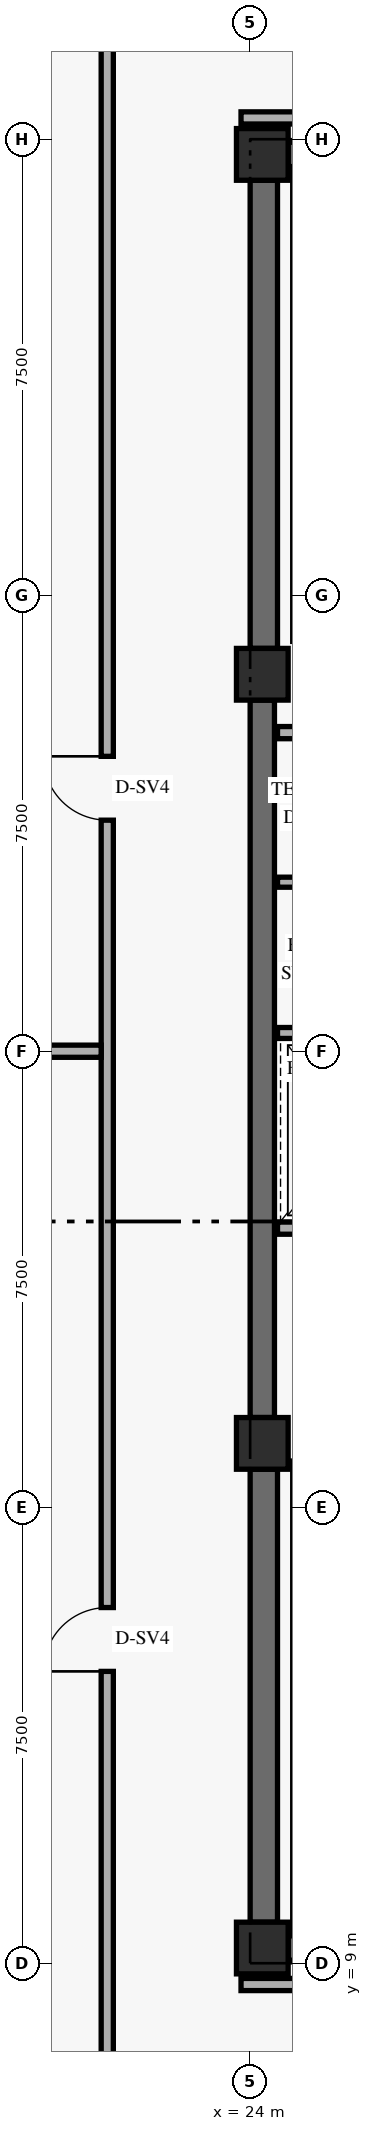
"""IFC4 building model, lengths in metres.
Left out: names, types, materials, properties, quantities, classifications, styles, units other than length and angle.
Written with IfcOpenShell. Run it as: python <this file> out.ifc"""

import sys

from ifc_helpers import new_model, si_unit, direction, frame, frame_2d, origin, origin_2d, place, context, subcontext, project, spatial, rectangle, extrude, element, fill, save


model = new_model("IFC4")
c1 = context("Model", 3, precision=1e-05, world=origin(), true_north=direction((0.0, 1.0)))
c2 = subcontext(c1, "Body", "Model", "MODEL_VIEW")
j1 = project(units=[si_unit("LENGTHUNIT", "METRE"), si_unit("PLANEANGLEUNIT", "RADIAN")], contexts=[c1])
p1 = place(None, origin())
s1 = spatial("IfcSite", under=j1, at=p1, CompositionType="ELEMENT")
p2 = place(p1, origin())
s2 = spatial("IfcBuilding", under=s1, at=p2, CompositionType="ELEMENT")
p3 = place(p2, frame((0.0, 0.0, 135.6)))
s3 = spatial("IfcBuildingStorey", under=s2, at=p3, CompositionType="ELEMENT", Elevation=135.6)
p4 = place(p3, frame((24.225, 9.675, 0.0), z_axis=(0.0, 0.0, 1.0), x_axis=(0.0, 1.0, 0.0)))
e1 = element("IfcWall", 1, at=p4, inside=s3, PredefinedType="SHEAR", context=c2, shape_type="SweptSolid", body=[
    extrude(rectangle(XDim=7.45, YDim=0.45, at=frame_2d((3.725, 0.0))), origin(), (0.0, 0.0, 1.0), 4.549),
])
p5 = place(p3, frame((24.2, 17.975, 0.0), z_axis=(0.0, 0.0, 1.0), x_axis=(0.0, 1.0, 0.0)))
e2 = element("IfcWall", 2, at=p5, inside=s3, PredefinedType="SHEAR", context=c2, shape_type="SweptSolid", body=[
    extrude(rectangle(XDim=11.8, YDim=0.4, at=frame_2d((5.9, 0.0))), origin(), (0.0, 0.0, 1.0), 4.549),
])
p6 = place(p3, frame((24.225, 30.625, 0.0), z_axis=(0.0, 0.0, 1.0), x_axis=(0.0, 1.0, 0.0)))
e3 = element("IfcWall", 3, at=p6, inside=s3, PredefinedType="SHEAR", context=c2, shape_type="SweptSolid", body=[
    extrude(rectangle(XDim=7.7, YDim=0.45, at=frame_2d((3.85, 0.0))), origin(), (0.0, 0.0, 1.0), 4.549),
])
for number, where, z_axis, x_axis in (
    (4, (24.625, 9.25, 0.0), (0.0, 0.0, 1.0), (1.0, 0.0, 0.0)),
    (5, (24.625, 38.75, 0.0), (0.0, 0.0, 1.0), (1.0, 0.0, 0.0)),
):
    element("IfcWall", number, at=place(p3, frame(where, z_axis=z_axis, x_axis=x_axis)), inside=s3, PredefinedType="SHEAR", context=c2, shape_type="SweptSolid", body=[
        extrude(rectangle(XDim=10.15, YDim=0.4, at=frame_2d((5.075, 0.0))), origin(), (0.0, 0.0, 1.0), 5.16),
    ])
for number, where, z_axis, x_axis in (
    (6, (24.2, 9.25, 0.0), (0.0, 0.0, 1.0), (1.0, 0.0, 0.0)),
    (7, (24.2, 17.55, 0.0), (0.0, 0.0, 1.0), (1.0, 0.0, 0.0)),
    (8, (24.2, 30.2, 0.0), (0.0, 0.0, 1.0), (1.0, 0.0, 0.0)),
    (9, (24.2, 38.75, 0.0), (0.0, 0.0, 1.0), (1.0, 0.0, 0.0)),
):
    element("IfcColumn", number, at=place(p3, frame(where, z_axis=z_axis, x_axis=x_axis)), inside=s3, PredefinedType="COLUMN", context=c2, shape_type="SweptSolid", body=[
        extrude(rectangle(XDim=0.85, YDim=0.85, at=origin_2d()), origin(), (0.0, 0.0, 1.0), 5.4),
    ])
p7 = place(p3, frame((24.45, 21.09, 0.0), z_axis=(0.0, 0.0, 1.0), x_axis=(1.0, 0.0, 0.0)))
e10 = element("IfcWall", 10, at=p7, inside=s3, PredefinedType="STANDARD", context=c2, shape_type="SweptSolid", body=[
    extrude(rectangle(XDim=6.83, YDim=0.2, at=frame_2d((3.415, 0.0))), origin(), (0.0, 0.0, 1.0), 5.16),
])
p8 = place(p7, frame((0.72, 0.0, 0.0)))
e11 = element("IfcOpeningElement", 11, at=p8, cuts=e10, PredefinedType="OPENING", context=c2, shape_type="SweptSolid", body=[
    extrude(rectangle(XDim=1.1, YDim=2.2, at=frame_2d((0.55, 1.1))), frame((0.0, 0.11, 0.0), z_axis=(0.0, -1.0, 0.0), x_axis=(1.0, 0.0, 0.0)), (0.0, 0.0, 1.0), 0.22),
])
p9 = place(p7, frame((3.32, 0.0, 0.0)))
e12 = element("IfcOpeningElement", 12, at=p9, cuts=e10, PredefinedType="OPENING", context=c2, shape_type="SweptSolid", body=[
    extrude(rectangle(XDim=1.1, YDim=2.2, at=frame_2d((0.55, 1.1))), frame((0.0, 0.11, 0.0), z_axis=(0.0, -1.0, 0.0), x_axis=(1.0, 0.0, 0.0)), (0.0, 0.0, 1.0), 0.22),
])
p10 = place(p3, frame((24.45, 24.3, 0.0), z_axis=(0.0, 0.0, 1.0), x_axis=(1.0, 0.0, 0.0)))
e13 = element("IfcWall", 13, at=p10, inside=s3, PredefinedType="STANDARD", context=c2, shape_type="SweptSolid", body=[
    extrude(rectangle(XDim=6.83, YDim=0.18, at=frame_2d((3.415, 0.0))), origin(), (0.0, 0.0, 1.0), 5.16),
])
p11 = place(p3, frame((24.45, 29.24, 0.0), z_axis=(0.0, 0.0, 1.0), x_axis=(1.0, 0.0, 0.0)))
e14 = element("IfcWall", 14, at=p11, inside=s3, PredefinedType="STANDARD", context=c2, shape_type="SweptSolid", body=[
    extrude(rectangle(XDim=3.65, YDim=0.2, at=frame_2d((1.825, 0.0))), origin(), (0.0, 0.0, 1.0), 5.16),
])
p12 = place(p3, frame((24.45, 26.78, 0.0), z_axis=(0.0, 0.0, 1.0), x_axis=(1.0, 0.0, 0.0)))
e15 = element("IfcWall", 15, at=p12, inside=s3, PredefinedType="PARTITIONING", context=c2, shape_type="SweptSolid", body=[
    extrude(rectangle(XDim=3.55, YDim=0.165, at=frame_2d((1.775, 0.0))), origin(), (0.0, 0.0, 1.0), 5.16),
])
p13 = place(p3, frame((21.65, 6.8, 0.0), z_axis=(0.0, 0.0, 1.0), x_axis=(0.0, 1.0, 0.0)))
e16 = element("IfcWall", 16, at=p13, inside=s3, PredefinedType="STANDARD", context=c2, shape_type="SweptSolid", body=[
    extrude(rectangle(XDim=34.4, YDim=0.2, at=frame_2d((17.2, 0.0))), origin(), (0.0, 0.0, 1.0), 4.531),
])
p14 = place(p13, frame((7.0, 0.0, 0.0)))
e17 = element("IfcOpeningElement", 17, at=p14, cuts=e16, PredefinedType="OPENING", context=c2, shape_type="SweptSolid", body=[
    extrude(rectangle(XDim=1.05, YDim=2.15, at=frame_2d((0.525, 1.075))), frame((0.0, 0.11, 0.0), z_axis=(0.0, -1.0, 0.0), x_axis=(1.0, 0.0, 0.0)), (0.0, 0.0, 1.0), 0.22),
])
p15 = place(p13, frame((21.0, 0.0, 0.0)))
e18 = element("IfcOpeningElement", 18, at=p15, cuts=e16, PredefinedType="OPENING", context=c2, shape_type="SweptSolid", body=[
    extrude(rectangle(XDim=1.05, YDim=2.15, at=frame_2d((0.525, 1.075))), frame((0.0, 0.11, 0.0), z_axis=(0.0, -1.0, 0.0), x_axis=(1.0, 0.0, 0.0)), (0.0, 0.0, 1.0), 0.22),
])
for number, where, z_axis, x_axis in (
    (19, (23.85, 39.35, 0.0), (0.0, 0.0, 1.0), (1.0, 0.0, 0.0)),
    (20, (23.85, 8.65, 0.0), (0.0, 0.0, 1.0), (1.0, 0.0, 0.0)),
):
    element("IfcWall", number, at=place(p3, frame(where, z_axis=z_axis, x_axis=x_axis)), inside=s3, PredefinedType="STANDARD", context=c2, shape_type="SweptSolid", body=[
        extrude(rectangle(XDim=11.47, YDim=0.2, at=frame_2d((5.735, 0.0))), origin(), (0.0, 0.0, 1.0), 4.531),
    ])
p16 = place(p3, frame((10.11, 24.0, 0.0), z_axis=(0.0, 0.0, 1.0), x_axis=(1.0, 0.0, 0.0)))
e21 = element("IfcWall", 21, at=p16, inside=s3, PredefinedType="STANDARD", context=c2, shape_type="SweptSolid", body=[
    extrude(rectangle(XDim=11.44, YDim=0.2, at=frame_2d((5.72, 0.0))), origin(), (0.0, 0.0, 1.0), 4.531),
])
p17 = place(p14, origin())
e22 = element("IfcDoor", 22, at=p17, inside=s3, OperationType="SINGLE_SWING_LEFT", PredefinedType="DOOR", context=c2, shape_type="SweptSolid", body=[
    extrude(rectangle(XDim=1.05, YDim=2.15, at=frame_2d((0.525, 1.075))), frame((0.0, 0.025, 0.0), z_axis=(0.0, -1.0, 0.0), x_axis=(1.0, 0.0, 0.0)), (0.0, 0.0, 1.0), 0.05),
])
fill(e17, e22)
p18 = place(p15, origin())
e23 = element("IfcDoor", 23, at=p18, inside=s3, OperationType="SINGLE_SWING_RIGHT", PredefinedType="DOOR", context=c2, shape_type="SweptSolid", body=[
    extrude(rectangle(XDim=1.05, YDim=2.15, at=frame_2d((0.525, 1.075))), frame((0.0, 0.025, 0.0), z_axis=(0.0, -1.0, 0.0), x_axis=(1.0, 0.0, 0.0)), (0.0, 0.0, 1.0), 0.05),
])
fill(e18, e23)
save(model, sys.argv[1])
